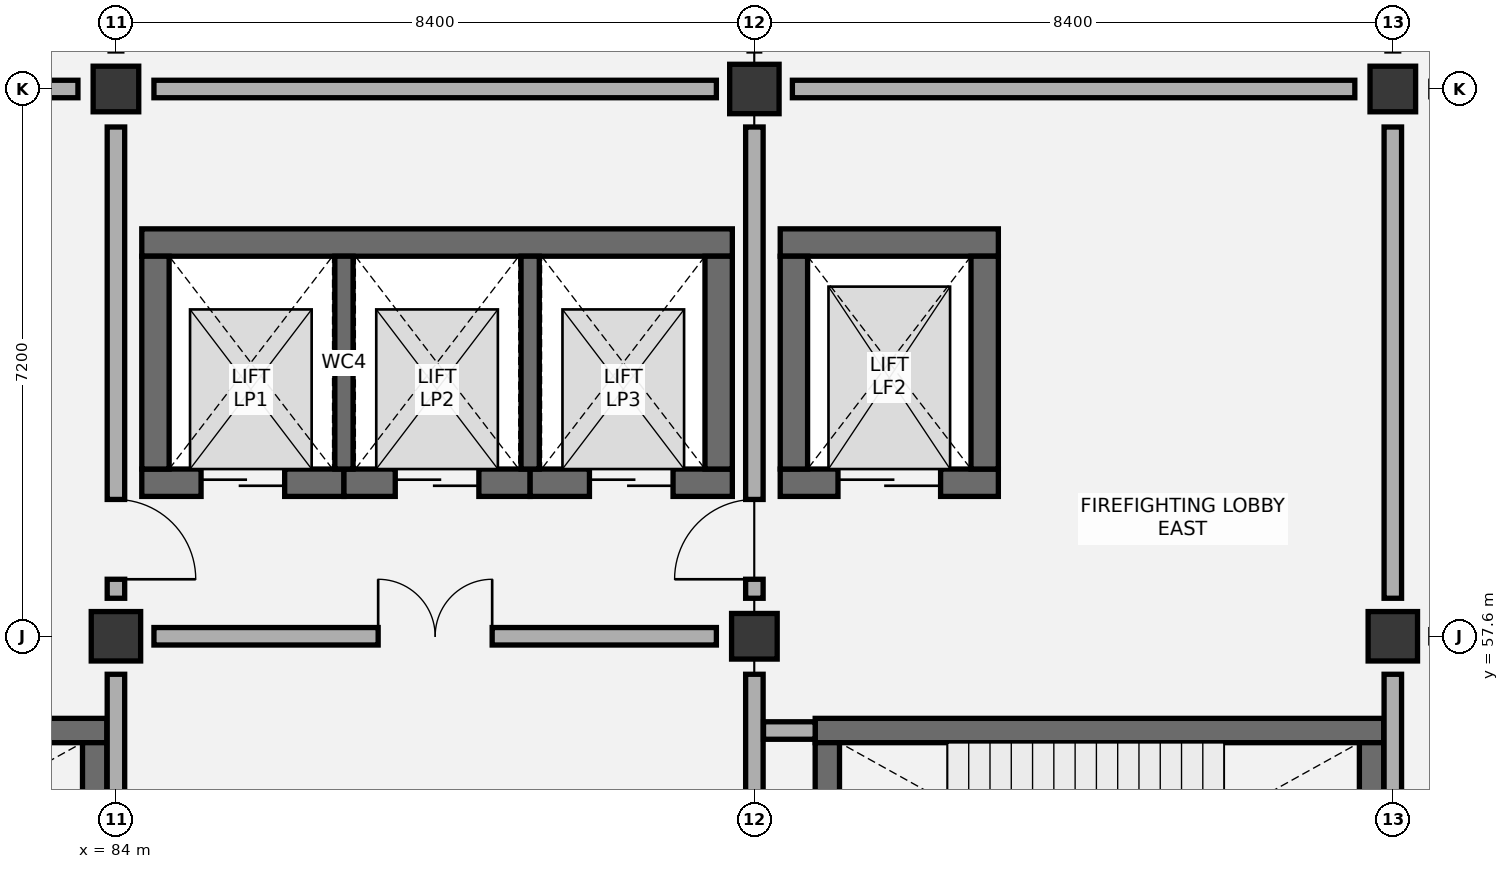
"""IFC4 building model, lengths in metres.
Left out: names, types, materials, properties, quantities, classifications, styles, units other than length and angle.
Written with IfcOpenShell. Run it as: python <this file> out.ifc"""

import sys

from ifc_helpers import new_model, si_unit, direction, frame, frame_2d, origin, origin_2d, place, context, subcontext, project, spatial, rectangle, extrude, element, fill, save


model = new_model("IFC4")
c1 = context("Model", 3, precision=1e-05, world=origin(), true_north=direction((0.0, 1.0)))
c2 = subcontext(c1, "Body", "Model", "MODEL_VIEW")
j1 = project(units=[si_unit("LENGTHUNIT", "METRE"), si_unit("PLANEANGLEUNIT", "RADIAN")], contexts=[c1])
p1 = place(None, origin())
s1 = spatial("IfcSite", under=j1, at=p1, CompositionType="ELEMENT")
p2 = place(p1, origin())
s2 = spatial("IfcBuilding", under=s1, at=p2, CompositionType="ELEMENT")
p3 = place(p2, frame((0.0, 0.0, 52.2)))
s3 = spatial("IfcBuildingStorey", under=s2, at=p3, CompositionType="ELEMENT", Elevation=52.2)
p4 = place(p3, frame((84.0, 57.6, 0.0), z_axis=(0.0, 0.0, 1.0), x_axis=(1.0, 0.0, 0.0)))
e1 = element("IfcColumn", 1, at=p4, inside=s3, PredefinedType="COLUMN", context=c2, shape_type="SweptSolid", body=[
    extrude(rectangle(XDim=0.65, YDim=0.65, at=origin_2d()), origin(), (0.0, 0.0, 1.0), 4.2),
])
for number, where, z_axis, x_axis in (
    (2, (84.0, 64.8, 0.0), (0.0, 0.0, 1.0), (1.0, 0.0, 0.0)),
    (3, (92.4, 57.6, 0.0), (0.0, 0.0, 1.0), (1.0, 0.0, 0.0)),
):
    element("IfcColumn", number, at=place(p3, frame(where, z_axis=z_axis, x_axis=x_axis)), inside=s3, PredefinedType="COLUMN", context=c2, shape_type="SweptSolid", body=[
        extrude(rectangle(XDim=0.6, YDim=0.6, at=origin_2d()), origin(), (0.0, 0.0, 1.0), 4.2),
    ])
for number, where, z_axis, x_axis in (
    (4, (92.4, 64.8, 0.0), (0.0, 0.0, 1.0), (1.0, 0.0, 0.0)),
    (5, (100.8, 57.6, 0.0), (0.0, 0.0, 1.0), (1.0, 0.0, 0.0)),
):
    element("IfcColumn", number, at=place(p3, frame(where, z_axis=z_axis, x_axis=x_axis)), inside=s3, PredefinedType="COLUMN", context=c2, shape_type="SweptSolid", body=[
        extrude(rectangle(XDim=0.65, YDim=0.65, at=origin_2d()), origin(), (0.0, 0.0, 1.0), 4.2),
    ])
p5 = place(p3, frame((100.8, 64.8, 0.0), z_axis=(0.0, 0.0, 1.0), x_axis=(1.0, 0.0, 0.0)))
e6 = element("IfcColumn", 6, at=p5, inside=s3, PredefinedType="COLUMN", context=c2, shape_type="SweptSolid", body=[
    extrude(rectangle(XDim=0.6, YDim=0.6, at=origin_2d()), origin(), (0.0, 0.0, 1.0), 4.2),
])
p6 = place(p3, frame((76.4, 56.36, 0.0), z_axis=(0.0, 0.0, 1.0), x_axis=(1.0, 0.0, 0.0)))
e7 = element("IfcWall", 7, at=p6, inside=s3, PredefinedType="SHEAR", context=c2, shape_type="SweptSolid", body=[
    extrude(rectangle(XDim=7.48, YDim=0.32, at=frame_2d((3.74, 0.0))), origin(), (0.0, 0.0, 1.0), 3.92),
])
p7 = place(p3, frame((83.72, 52.4, 0.0), z_axis=(0.0, 0.0, 1.0), x_axis=(0.0, 1.0, 0.0)))
e8 = element("IfcWall", 8, at=p7, inside=s3, PredefinedType="SHEAR", context=c2, shape_type="SweptSolid", body=[
    extrude(rectangle(XDim=3.8, YDim=0.32, at=frame_2d((1.9, 0.0))), origin(), (0.0, 0.0, 1.0), 3.92),
])
p8 = place(p3, frame((93.2, 56.36, 0.0), z_axis=(0.0, 0.0, 1.0), x_axis=(1.0, 0.0, 0.0)))
e9 = element("IfcWall", 9, at=p8, inside=s3, PredefinedType="SHEAR", context=c2, shape_type="SweptSolid", body=[
    extrude(rectangle(XDim=7.48, YDim=0.32, at=frame_2d((3.74, 0.0))), origin(), (0.0, 0.0, 1.0), 3.92),
])
for number, where, z_axis, x_axis in (
    (10, (93.36, 52.4, 0.0), (0.0, 0.0, 1.0), (0.0, 1.0, 0.0)),
    (11, (100.52, 52.4, 0.0), (0.0, 0.0, 1.0), (0.0, 1.0, 0.0)),
):
    element("IfcWall", number, at=place(p3, frame(where, z_axis=z_axis, x_axis=x_axis)), inside=s3, PredefinedType="SHEAR", context=c2, shape_type="SweptSolid", body=[
        extrude(rectangle(XDim=3.8, YDim=0.32, at=frame_2d((1.9, 0.0))), origin(), (0.0, 0.0, 1.0), 3.92),
    ])
p9 = place(p3, frame((84.34, 62.78, 0.0), z_axis=(0.0, 0.0, 1.0), x_axis=(1.0, 0.0, 0.0)))
e12 = element("IfcWall", 12, at=p9, inside=s3, PredefinedType="SHEAR", context=c2, shape_type="SweptSolid", body=[
    extrude(rectangle(XDim=7.77, YDim=0.36, at=frame_2d((3.885, 0.0))), origin(), (0.0, 0.0, 1.0), 3.92),
])
p10 = place(p3, frame((84.34, 59.62, 0.0), z_axis=(0.0, 0.0, 1.0), x_axis=(1.0, 0.0, 0.0)))
e13 = element("IfcWall", 13, at=p10, inside=s3, PredefinedType="SHEAR", context=c2, shape_type="SweptSolid", body=[
    extrude(rectangle(XDim=2.66, YDim=0.36, at=frame_2d((1.33, 0.0))), origin(), (0.0, 0.0, 1.0), 3.92),
])
p11 = place(p10, frame((0.78, 0.0, 0.0)))
e14 = element("IfcOpeningElement", 14, at=p11, cuts=e13, PredefinedType="OPENING", context=c2, shape_type="SweptSolid", body=[
    extrude(rectangle(XDim=1.1, YDim=2.15, at=frame_2d((0.55, 1.075))), frame((0.0, 0.19, 0.0), z_axis=(0.0, -1.0, 0.0), x_axis=(1.0, 0.0, 0.0)), (0.0, 0.0, 1.0), 0.38),
])
p12 = place(p3, frame((87.0, 59.62, 0.0), z_axis=(0.0, 0.0, 1.0), x_axis=(1.0, 0.0, 0.0)))
e15 = element("IfcWall", 15, at=p12, inside=s3, PredefinedType="SHEAR", context=c2, shape_type="SweptSolid", body=[
    extrude(rectangle(XDim=2.45, YDim=0.36, at=frame_2d((1.225, 0.0))), origin(), (0.0, 0.0, 1.0), 3.92),
])
p13 = place(p12, frame((0.675, 0.0, 0.0)))
e16 = element("IfcOpeningElement", 16, at=p13, cuts=e15, PredefinedType="OPENING", context=c2, shape_type="SweptSolid", body=[
    extrude(rectangle(XDim=1.1, YDim=2.15, at=frame_2d((0.55, 1.075))), frame((0.0, 0.19, 0.0), z_axis=(0.0, -1.0, 0.0), x_axis=(1.0, 0.0, 0.0)), (0.0, 0.0, 1.0), 0.38),
])
p14 = place(p3, frame((89.45, 59.62, 0.0), z_axis=(0.0, 0.0, 1.0), x_axis=(1.0, 0.0, 0.0)))
e17 = element("IfcWall", 17, at=p14, inside=s3, PredefinedType="SHEAR", context=c2, shape_type="SweptSolid", body=[
    extrude(rectangle(XDim=2.66, YDim=0.36, at=frame_2d((1.33, 0.0))), origin(), (0.0, 0.0, 1.0), 3.92),
])
p15 = place(p14, frame((0.78, 0.0, 0.0)))
e18 = element("IfcOpeningElement", 18, at=p15, cuts=e17, PredefinedType="OPENING", context=c2, shape_type="SweptSolid", body=[
    extrude(rectangle(XDim=1.1, YDim=2.15, at=frame_2d((0.55, 1.075))), frame((0.0, 0.19, 0.0), z_axis=(0.0, -1.0, 0.0), x_axis=(1.0, 0.0, 0.0)), (0.0, 0.0, 1.0), 0.38),
])
for number, where, z_axis, x_axis in (
    (19, (84.52, 59.8, 0.0), (0.0, 0.0, 1.0), (0.0, 1.0, 0.0)),
    (20, (91.93, 59.8, 0.0), (0.0, 0.0, 1.0), (0.0, 1.0, 0.0)),
):
    element("IfcWall", number, at=place(p3, frame(where, z_axis=z_axis, x_axis=x_axis)), inside=s3, PredefinedType="SHEAR", context=c2, shape_type="SweptSolid", body=[
        extrude(rectangle(XDim=2.8, YDim=0.36, at=frame_2d((1.4, 0.0))), origin(), (0.0, 0.0, 1.0), 3.92),
    ])
for number, where, z_axis, x_axis in (
    (21, (87.0, 59.8, 0.0), (0.0, 0.0, 1.0), (0.0, 1.0, 0.0)),
    (22, (89.45, 59.8, 0.0), (0.0, 0.0, 1.0), (0.0, 1.0, 0.0)),
):
    element("IfcWall", number, at=place(p3, frame(where, z_axis=z_axis, x_axis=x_axis)), inside=s3, PredefinedType="SHEAR", context=c2, shape_type="SweptSolid", body=[
        extrude(rectangle(XDim=2.8, YDim=0.24, at=frame_2d((1.4, 0.0))), origin(), (0.0, 0.0, 1.0), 3.92),
    ])
p16 = place(p3, frame((92.74, 62.78, 0.0), z_axis=(0.0, 0.0, 1.0), x_axis=(1.0, 0.0, 0.0)))
e23 = element("IfcWall", 23, at=p16, inside=s3, PredefinedType="SHEAR", context=c2, shape_type="SweptSolid", body=[
    extrude(rectangle(XDim=2.87, YDim=0.36, at=frame_2d((1.435, 0.0))), origin(), (0.0, 0.0, 1.0), 3.92),
])
p17 = place(p3, frame((92.74, 59.62, 0.0), z_axis=(0.0, 0.0, 1.0), x_axis=(1.0, 0.0, 0.0)))
e24 = element("IfcWall", 24, at=p17, inside=s3, PredefinedType="SHEAR", context=c2, shape_type="SweptSolid", body=[
    extrude(rectangle(XDim=2.87, YDim=0.36, at=frame_2d((1.435, 0.0))), origin(), (0.0, 0.0, 1.0), 3.92),
])
p18 = place(p17, frame((0.76, 0.0, 0.0)))
e25 = element("IfcOpeningElement", 25, at=p18, cuts=e24, PredefinedType="OPENING", context=c2, shape_type="SweptSolid", body=[
    extrude(rectangle(XDim=1.35, YDim=2.2, at=frame_2d((0.675, 1.1))), frame((0.0, 0.19, 0.0), z_axis=(0.0, -1.0, 0.0), x_axis=(1.0, 0.0, 0.0)), (0.0, 0.0, 1.0), 0.38),
])
for number, where, z_axis, x_axis in (
    (26, (92.92, 59.8, 0.0), (0.0, 0.0, 1.0), (0.0, 1.0, 0.0)),
    (27, (95.43, 59.8, 0.0), (0.0, 0.0, 1.0), (0.0, 1.0, 0.0)),
):
    element("IfcWall", number, at=place(p3, frame(where, z_axis=z_axis, x_axis=x_axis)), inside=s3, PredefinedType="SHEAR", context=c2, shape_type="SweptSolid", body=[
        extrude(rectangle(XDim=2.8, YDim=0.36, at=frame_2d((1.4, 0.0))), origin(), (0.0, 0.0, 1.0), 3.92),
    ])
p19 = place(p3, frame((84.0, 50.9, 0.0), z_axis=(0.0, 0.0, 1.0), x_axis=(0.0, 1.0, 0.0)))
e28 = element("IfcWall", 28, at=p19, inside=s3, PredefinedType="PARTITIONING", context=c2, shape_type="SweptSolid", body=[
    extrude(rectangle(XDim=6.2, YDim=0.23, at=frame_2d((3.1, 0.0))), origin(), (0.0, 0.0, 1.0), 3.415),
])
p20 = place(p19, frame((0.05, 0.0, 0.0)))
e29 = element("IfcOpeningElement", 29, at=p20, cuts=e28, PredefinedType="OPENING", context=c2, shape_type="SweptSolid", body=[
    extrude(rectangle(XDim=1.05, YDim=2.15, at=frame_2d((0.525, 1.075))), frame((0.0, 0.125, 0.0), z_axis=(0.0, -1.0, 0.0), x_axis=(1.0, 0.0, 0.0)), (0.0, 0.0, 1.0), 0.25),
])
p21 = place(p3, frame((84.0, 58.1, 0.0), z_axis=(0.0, 0.0, 1.0), x_axis=(0.0, 1.0, 0.0)))
e30 = element("IfcWall", 30, at=p21, inside=s3, PredefinedType="PARTITIONING", context=c2, shape_type="SweptSolid", body=[
    extrude(rectangle(XDim=6.2, YDim=0.23, at=frame_2d((3.1, 0.0))), origin(), (0.0, 0.0, 1.0), 3.415),
])
p22 = place(p21, frame((0.25, 0.0, 0.0)))
e31 = element("IfcOpeningElement", 31, at=p22, cuts=e30, PredefinedType="OPENING", context=c2, shape_type="SweptSolid", body=[
    extrude(rectangle(XDim=1.05, YDim=2.15, at=frame_2d((0.525, 1.075))), frame((0.0, 0.125, 0.0), z_axis=(0.0, -1.0, 0.0), x_axis=(1.0, 0.0, 0.0)), (0.0, 0.0, 1.0), 0.25),
])
p23 = place(p3, frame((76.1, 64.8, 0.0), z_axis=(0.0, 0.0, 1.0), x_axis=(1.0, 0.0, 0.0)))
e32 = element("IfcWall", 32, at=p23, inside=s3, PredefinedType="PARTITIONING", context=c2, shape_type="SweptSolid", body=[
    extrude(rectangle(XDim=7.4, YDim=0.23, at=frame_2d((3.7, 0.0))), origin(), (0.0, 0.0, 1.0), 3.415),
])
p24 = place(p3, frame((92.4, 50.9, 0.0), z_axis=(0.0, 0.0, 1.0), x_axis=(0.0, 1.0, 0.0)))
e33 = element("IfcWall", 33, at=p24, inside=s3, PredefinedType="PARTITIONING", context=c2, shape_type="SweptSolid", body=[
    extrude(rectangle(XDim=6.2, YDim=0.23, at=frame_2d((3.1, 0.0))), origin(), (0.0, 0.0, 1.0), 3.415),
])
p25 = place(p24, frame((0.05, 0.0, 0.0)))
e34 = element("IfcOpeningElement", 34, at=p25, cuts=e33, PredefinedType="OPENING", context=c2, shape_type="SweptSolid", body=[
    extrude(rectangle(XDim=1.05, YDim=2.15, at=frame_2d((0.525, 1.075))), frame((0.0, 0.125, 0.0), z_axis=(0.0, -1.0, 0.0), x_axis=(1.0, 0.0, 0.0)), (0.0, 0.0, 1.0), 0.25),
])
p26 = place(p3, frame((84.5, 57.6, 0.0), z_axis=(0.0, 0.0, 1.0), x_axis=(1.0, 0.0, 0.0)))
e35 = element("IfcWall", 35, at=p26, inside=s3, PredefinedType="PARTITIONING", context=c2, shape_type="SweptSolid", body=[
    extrude(rectangle(XDim=7.4, YDim=0.23, at=frame_2d((3.7, 0.0))), origin(), (0.0, 0.0, 1.0), 3.465),
])
p27 = place(p26, frame((2.95, 0.0, 0.0)))
e36 = element("IfcOpeningElement", 36, at=p27, cuts=e35, PredefinedType="OPENING", context=c2, shape_type="SweptSolid", body=[
    extrude(rectangle(XDim=1.5, YDim=2.15, at=frame_2d((0.75, 1.075))), frame((0.0, 0.125, 0.0), z_axis=(0.0, -1.0, 0.0), x_axis=(1.0, 0.0, 0.0)), (0.0, 0.0, 1.0), 0.25),
])
p28 = place(p3, frame((92.4, 58.1, 0.0), z_axis=(0.0, 0.0, 1.0), x_axis=(0.0, 1.0, 0.0)))
e37 = element("IfcWall", 37, at=p28, inside=s3, PredefinedType="PARTITIONING", context=c2, shape_type="SweptSolid", body=[
    extrude(rectangle(XDim=6.2, YDim=0.23, at=frame_2d((3.1, 0.0))), origin(), (0.0, 0.0, 1.0), 3.515),
])
p29 = place(p28, frame((0.25, 0.0, 0.0)))
e38 = element("IfcOpeningElement", 38, at=p29, cuts=e37, PredefinedType="OPENING", context=c2, shape_type="SweptSolid", body=[
    extrude(rectangle(XDim=1.05, YDim=2.15, at=frame_2d((0.525, 1.075))), frame((0.0, 0.125, 0.0), z_axis=(0.0, -1.0, 0.0), x_axis=(1.0, 0.0, 0.0)), (0.0, 0.0, 1.0), 0.25),
])
p30 = place(p3, frame((84.5, 64.8, 0.0), z_axis=(0.0, 0.0, 1.0), x_axis=(1.0, 0.0, 0.0)))
e39 = element("IfcWall", 39, at=p30, inside=s3, PredefinedType="PARTITIONING", context=c2, shape_type="SweptSolid", body=[
    extrude(rectangle(XDim=7.4, YDim=0.23, at=frame_2d((3.7, 0.0))), origin(), (0.0, 0.0, 1.0), 3.465),
])
p31 = place(p3, frame((100.8, 50.9, 0.0), z_axis=(0.0, 0.0, 1.0), x_axis=(0.0, 1.0, 0.0)))
e40 = element("IfcWall", 40, at=p31, inside=s3, PredefinedType="PARTITIONING", context=c2, shape_type="SweptSolid", body=[
    extrude(rectangle(XDim=6.2, YDim=0.23, at=frame_2d((3.1, 0.0))), origin(), (0.0, 0.0, 1.0), 3.515),
])
p32 = place(p3, frame((92.52, 56.36, 0.0), z_axis=(0.0, 0.0, 1.0), x_axis=(1.0, 0.0, 0.0)))
e41 = element("IfcWall", 41, at=p32, inside=s3, PredefinedType="PARTITIONING", context=c2, shape_type="SweptSolid", body=[
    extrude(rectangle(XDim=0.68, YDim=0.23, at=frame_2d((0.34, 0.0))), origin(), (0.0, 0.0, 1.0), 3.92),
])
p33 = place(p3, frame((100.8, 58.1, 0.0), z_axis=(0.0, 0.0, 1.0), x_axis=(0.0, 1.0, 0.0)))
e42 = element("IfcWall", 42, at=p33, inside=s3, PredefinedType="PARTITIONING", context=c2, shape_type="SweptSolid", body=[
    extrude(rectangle(XDim=6.2, YDim=0.23, at=frame_2d((3.1, 0.0))), origin(), (0.0, 0.0, 1.0), 3.415),
])
p34 = place(p3, frame((92.9, 64.8, 0.0), z_axis=(0.0, 0.0, 1.0), x_axis=(1.0, 0.0, 0.0)))
e43 = element("IfcWall", 43, at=p34, inside=s3, PredefinedType="PARTITIONING", context=c2, shape_type="SweptSolid", body=[
    extrude(rectangle(XDim=7.4, YDim=0.23, at=frame_2d((3.7, 0.0))), origin(), (0.0, 0.0, 1.0), 3.515),
])
p35 = place(p18, origin())
e44 = element("IfcDoor", 44, at=p35, inside=s3, OperationType="DOUBLE_DOOR_SLIDING", PredefinedType="DOOR", context=c2, shape_type="SweptSolid", body=[
    extrude(rectangle(XDim=1.35, YDim=2.2, at=frame_2d((0.675, 1.1))), frame((0.0, 0.025, 0.0), z_axis=(0.0, -1.0, 0.0), x_axis=(1.0, 0.0, 0.0)), (0.0, 0.0, 1.0), 0.05),
])
fill(e25, e44)
p36 = place(p11, origin())
e45 = element("IfcDoor", 45, at=p36, inside=s3, OperationType="DOUBLE_DOOR_SLIDING", PredefinedType="DOOR", context=c2, shape_type="SweptSolid", body=[
    extrude(rectangle(XDim=1.1, YDim=2.15, at=frame_2d((0.55, 1.075))), frame((0.0, 0.025, 0.0), z_axis=(0.0, -1.0, 0.0), x_axis=(1.0, 0.0, 0.0)), (0.0, 0.0, 1.0), 0.05),
])
fill(e14, e45)
p37 = place(p13, origin())
e46 = element("IfcDoor", 46, at=p37, inside=s3, OperationType="DOUBLE_DOOR_SLIDING", PredefinedType="DOOR", context=c2, shape_type="SweptSolid", body=[
    extrude(rectangle(XDim=1.1, YDim=2.15, at=frame_2d((0.55, 1.075))), frame((0.0, 0.025, 0.0), z_axis=(0.0, -1.0, 0.0), x_axis=(1.0, 0.0, 0.0)), (0.0, 0.0, 1.0), 0.05),
])
fill(e16, e46)
p38 = place(p15, origin())
e47 = element("IfcDoor", 47, at=p38, inside=s3, OperationType="DOUBLE_DOOR_SLIDING", PredefinedType="DOOR", context=c2, shape_type="SweptSolid", body=[
    extrude(rectangle(XDim=1.1, YDim=2.15, at=frame_2d((0.55, 1.075))), frame((0.0, 0.025, 0.0), z_axis=(0.0, -1.0, 0.0), x_axis=(1.0, 0.0, 0.0)), (0.0, 0.0, 1.0), 0.05),
])
fill(e18, e47)
p39 = place(p22, frame((1.05, 0.0, 0.0), z_axis=(0.0, 0.0, 1.0), x_axis=(-1.0, 0.0, 0.0)))
e48 = element("IfcDoor", 48, at=p39, inside=s3, OperationType="SINGLE_SWING_RIGHT", PredefinedType="DOOR", context=c2, shape_type="SweptSolid", body=[
    extrude(rectangle(XDim=1.05, YDim=2.15, at=frame_2d((0.525, 1.075))), frame((0.0, 0.025, 0.0), z_axis=(0.0, -1.0, 0.0), x_axis=(1.0, 0.0, 0.0)), (0.0, 0.0, 1.0), 0.05),
])
fill(e31, e48)
p40 = place(p27, origin())
e49 = element("IfcDoor", 49, at=p40, inside=s3, OperationType="DOUBLE_DOOR_SINGLE_SWING", PredefinedType="DOOR", context=c2, shape_type="SweptSolid", body=[
    extrude(rectangle(XDim=1.5, YDim=2.15, at=frame_2d((0.75, 1.075))), frame((0.0, 0.025, 0.0), z_axis=(0.0, -1.0, 0.0), x_axis=(1.0, 0.0, 0.0)), (0.0, 0.0, 1.0), 0.05),
])
fill(e36, e49)
p41 = place(p29, origin())
e50 = element("IfcDoor", 50, at=p41, inside=s3, OperationType="SINGLE_SWING_LEFT", PredefinedType="DOOR", context=c2, shape_type="SweptSolid", body=[
    extrude(rectangle(XDim=1.05, YDim=2.15, at=frame_2d((0.525, 1.075))), frame((0.0, 0.025, 0.0), z_axis=(0.0, -1.0, 0.0), x_axis=(1.0, 0.0, 0.0)), (0.0, 0.0, 1.0), 0.05),
])
fill(e38, e50)
save(model, sys.argv[1])
